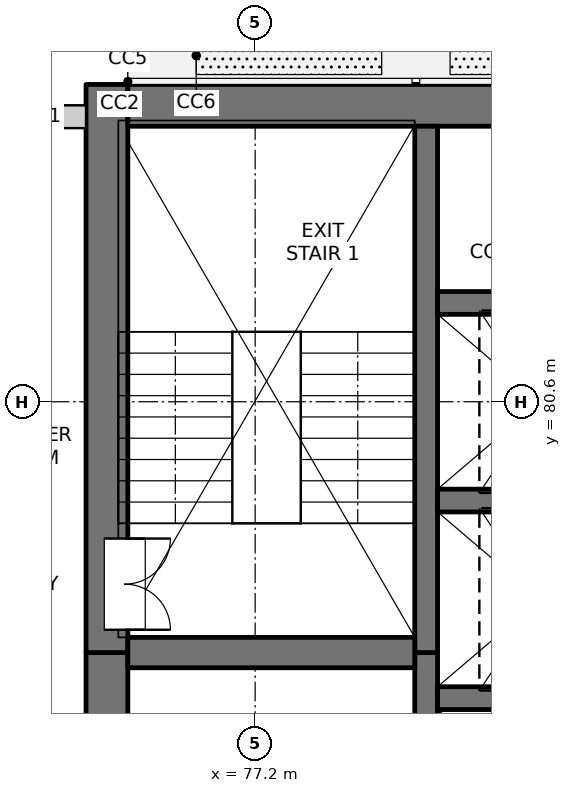
"""IFC4 building model, lengths in metres.
Left out: names, types, materials, properties, quantities, classifications, styles, units other than length and angle.
Written with IfcOpenShell. Run it as: python <this file> out.ifc"""

import sys

from ifc_helpers import new_model, si_unit, direction, frame, frame_2d, origin, place, context, subcontext, project, spatial, rectangle, extrude, element, fill, save


model = new_model("IFC4")
c1 = context("Model", 3, precision=1e-05, world=origin(), true_north=direction((0.0, 1.0)))
c2 = subcontext(c1, "Body", "Model", "MODEL_VIEW")
j1 = project(units=[si_unit("LENGTHUNIT", "METRE"), si_unit("PLANEANGLEUNIT", "RADIAN")], contexts=[c1])
p1 = place(None, origin())
s1 = spatial("IfcSite", under=j1, at=p1, CompositionType="ELEMENT")
p2 = place(p1, origin())
s2 = spatial("IfcBuilding", under=s1, at=p2, CompositionType="ELEMENT")
p3 = place(p2, frame((0.0, 0.0, 99.9)))
s3 = spatial("IfcBuildingStorey", under=s2, at=p3, CompositionType="ELEMENT", Elevation=99.9)
p4 = place(p3, frame((75.25, 54.975, -0.3), z_axis=(0.0, 0.0, 1.0), x_axis=(0.0, 1.0, 0.0)))
e1 = element("IfcWall", 1, at=p4, inside=s3, PredefinedType="SOLIDWALL", context=c2, shape_type="SweptSolid", body=[
    extrude(rectangle(XDim=22.325, YDim=0.55, at=frame_2d((11.163, 0.0))), origin(), (0.0, 0.0, 1.0), 3.45),
])
p5 = place(p4, frame((7.475, 0.0, 0.3)))
e2 = element("IfcOpeningElement", 2, at=p5, cuts=e1, PredefinedType="OPENING", context=c2, shape_type="SweptSolid", body=[
    extrude(rectangle(XDim=0.9, YDim=2.1, at=frame_2d((0.45, 1.05))), frame((0.0, 0.285, 0.0), z_axis=(0.0, -1.0, 0.0), x_axis=(1.0, 0.0, 0.0)), (0.0, 0.0, 1.0), 0.57),
])
p6 = place(p4, frame((10.775, 0.0, 0.3)))
e3 = element("IfcOpeningElement", 3, at=p6, cuts=e1, PredefinedType="OPENING", context=c2, shape_type="SweptSolid", body=[
    extrude(rectangle(XDim=0.9, YDim=2.1, at=frame_2d((0.45, 1.05))), frame((0.0, 0.285, 0.0), z_axis=(0.0, -1.0, 0.0), x_axis=(1.0, 0.0, 0.0)), (0.0, 0.0, 1.0), 0.57),
])
p7 = place(p4, frame((13.775, 0.0, 0.3)))
e4 = element("IfcOpeningElement", 4, at=p7, cuts=e1, PredefinedType="OPENING", context=c2, shape_type="SweptSolid", body=[
    extrude(rectangle(XDim=0.9, YDim=2.1, at=frame_2d((0.45, 1.05))), frame((0.0, 0.285, 0.0), z_axis=(0.0, -1.0, 0.0), x_axis=(1.0, 0.0, 0.0)), (0.0, 0.0, 1.0), 0.57),
])
p8 = place(p4, frame((16.775, 0.0, 0.3)))
e5 = element("IfcOpeningElement", 5, at=p8, cuts=e1, PredefinedType="OPENING", context=c2, shape_type="SweptSolid", body=[
    extrude(rectangle(XDim=0.9, YDim=2.1, at=frame_2d((0.45, 1.05))), frame((0.0, 0.285, 0.0), z_axis=(0.0, -1.0, 0.0), x_axis=(1.0, 0.0, 0.0)), (0.0, 0.0, 1.0), 0.57),
])
p9 = place(p4, frame((20.075, 0.0, 0.3)))
e6 = element("IfcOpeningElement", 6, at=p9, cuts=e1, PredefinedType="OPENING", context=c2, shape_type="SweptSolid", body=[
    extrude(rectangle(XDim=0.9, YDim=2.1, at=frame_2d((0.45, 1.05))), frame((0.0, 0.285, 0.0), z_axis=(0.0, -1.0, 0.0), x_axis=(1.0, 0.0, 0.0)), (0.0, 0.0, 1.0), 0.57),
])
p10 = place(p3, frame((75.25, 77.3, -0.3), z_axis=(0.0, 0.0, 1.0), x_axis=(0.0, 1.0, 0.0)))
e7 = element("IfcWall", 7, at=p10, inside=s3, PredefinedType="SOLIDWALL", context=c2, shape_type="SweptSolid", body=[
    extrude(rectangle(XDim=7.475, YDim=0.55, at=frame_2d((3.737, 0.0))), origin(), (0.0, 0.0, 1.0), 3.45),
])
p11 = place(p10, frame((0.3, 0.0, 0.3)))
e8 = element("IfcOpeningElement", 8, at=p11, cuts=e7, PredefinedType="OPENING", context=c2, shape_type="SweptSolid", body=[
    extrude(rectangle(XDim=1.2, YDim=2.1, at=frame_2d((0.6, 1.05))), frame((0.0, 0.285, 0.0), z_axis=(0.0, -1.0, 0.0), x_axis=(1.0, 0.0, 0.0)), (0.0, 0.0, 1.0), 0.57),
])
p12 = place(p3, frame((75.525, 84.5, -0.3), z_axis=(0.0, 0.0, 1.0), x_axis=(1.0, 0.0, 0.0)))
e9 = element("IfcWall", 9, at=p12, inside=s3, PredefinedType="SOLIDWALL", context=c2, shape_type="SweptSolid", body=[
    extrude(rectangle(XDim=18.95, YDim=0.55, at=frame_2d((9.475, 0.0))), origin(), (0.0, 0.0, 1.0), 3.45),
])
p13 = place(p3, frame((79.45, 60.95, -0.3), z_axis=(0.0, 0.0, 1.0), x_axis=(0.0, 1.0, 0.0)))
e10 = element("IfcWall", 10, at=p13, inside=s3, PredefinedType="SOLIDWALL", context=c2, shape_type="SweptSolid", body=[
    extrude(rectangle(XDim=16.35, YDim=0.3, at=frame_2d((8.175, 0.0))), origin(), (0.0, 0.0, 1.0), 3.45),
])
p14 = place(p3, frame((79.45, 77.3, -0.3), z_axis=(0.0, 0.0, 1.0), x_axis=(0.0, 1.0, 0.0)))
e11 = element("IfcWall", 11, at=p14, inside=s3, PredefinedType="SOLIDWALL", context=c2, shape_type="SweptSolid", body=[
    extrude(rectangle(XDim=6.925, YDim=0.3, at=frame_2d((3.462, 0.0))), origin(), (0.0, 0.0, 1.0), 3.45),
])
for number, where, z_axis, x_axis in (
    (12, (79.6, 76.7, -0.3), (0.0, 0.0, 1.0), (1.0, 0.0, 0.0)),
    (13, (79.6, 79.3, -0.3), (0.0, 0.0, 1.0), (1.0, 0.0, 0.0)),
    (14, (79.6, 81.9, -0.3), (0.0, 0.0, 1.0), (1.0, 0.0, 0.0)),
):
    element("IfcWall", number, at=place(p3, frame(where, z_axis=z_axis, x_axis=x_axis)), inside=s3, PredefinedType="SOLIDWALL", context=c2, shape_type="SweptSolid", body=[
        extrude(rectangle(XDim=3.0, YDim=0.3, at=frame_2d((1.5, 0.0))), origin(), (0.0, 0.0, 1.0), 3.45),
    ])
p15 = place(p3, frame((75.525, 77.3, -0.3), z_axis=(0.0, 0.0, 1.0), x_axis=(1.0, 0.0, 0.0)))
e15 = element("IfcWall", 15, at=p15, inside=s3, PredefinedType="SOLIDWALL", context=c2, shape_type="SweptSolid", body=[
    extrude(rectangle(XDim=3.775, YDim=0.4, at=frame_2d((1.888, 0.0))), origin(), (0.0, 0.0, 1.0), 3.45),
])
p16 = place(p3, frame((73.725, 84.35, 0.0), z_axis=(0.0, 0.0, 1.0), x_axis=(1.0, 0.0, 0.0)))
e16 = element("IfcWall", 16, at=p16, inside=s3, PredefinedType="SOLIDWALL", context=c2, shape_type="SweptSolid", body=[
    extrude(rectangle(XDim=1.25, YDim=0.3, at=frame_2d((0.625, 0.0))), origin(), (0.0, 0.0, 1.0), 2.7),
])
p17 = place(p11, origin())
e17 = element("IfcDoor", 17, at=p17, inside=s3, OperationType="DOUBLE_DOOR_SINGLE_SWING", PredefinedType="DOOR", context=c2, shape_type="SweptSolid", body=[
    extrude(rectangle(XDim=1.2, YDim=2.1, at=frame_2d((0.6, 1.05))), frame((0.0, -0.21, 0.0), z_axis=(0.0, -1.0, 0.0), x_axis=(1.0, 0.0, 0.0)), (0.0, 0.0, 1.0), 0.05),
])
fill(e8, e17)
save(model, sys.argv[1])
